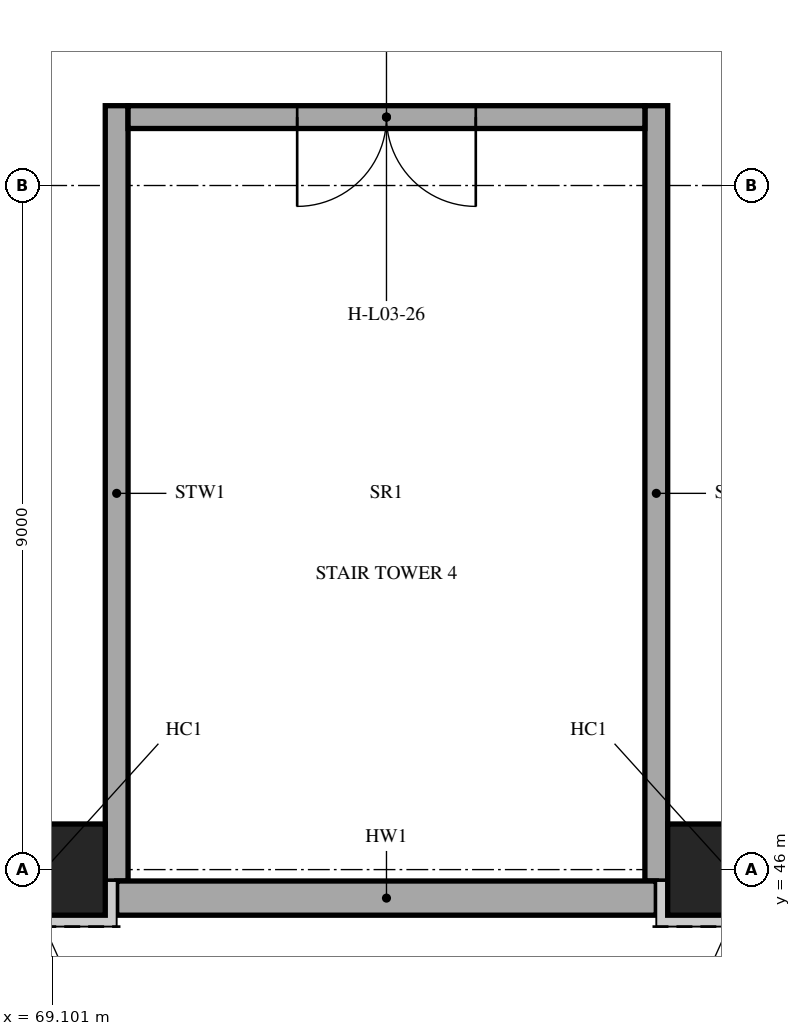
"""IFC4 building model, lengths in metres.
Left out: names, types, materials, properties, quantities, classifications, styles, units other than length and angle.
Written with IfcOpenShell. Run it as: python <this file> out.ifc"""

import sys

from ifc_helpers import new_model, si_unit, direction, frame, frame_2d, origin, origin_2d, place, context, subcontext, project, spatial, rectangle, extrude, element, fill, save


model = new_model("IFC4")
c1 = context("Model", 3, precision=1e-05, world=origin(), true_north=direction((0.0, 1.0)))
c2 = subcontext(c1, "Body", "Model", "MODEL_VIEW")
j1 = project(units=[si_unit("LENGTHUNIT", "METRE"), si_unit("PLANEANGLEUNIT", "RADIAN")], contexts=[c1])
p1 = place(None, origin())
s1 = spatial("IfcSite", under=j1, at=p1, CompositionType="ELEMENT")
p2 = place(p1, origin())
s2 = spatial("IfcBuilding", under=s1, at=p2, CompositionType="ELEMENT")
p3 = place(p2, frame((0.0, 0.0, 15.0)))
s3 = spatial("IfcBuildingStorey", under=s2, at=p3, CompositionType="ELEMENT", Elevation=15.0)
for number, where, z_axis, x_axis in (
    (1, (69.0, 46.0, 0.0), (0.0, 0.0, 1.0), (1.0, 0.0, 0.0)),
    (2, (78.0, 46.0, 0.0), (0.0, 0.0, 1.0), (1.0, 0.0, 0.0)),
):
    element("IfcColumn", number, at=place(p3, frame(where, z_axis=z_axis, x_axis=x_axis)), inside=s3, PredefinedType="COLUMN", context=c2, shape_type="SweptSolid", body=[
        extrude(rectangle(XDim=1.6, YDim=1.2, at=origin_2d()), origin(), (0.0, 0.0, 1.0), 4.2),
    ])
for number, where, z_axis, x_axis in (
    (3, (69.95, 45.85, 0.0), (0.0, 0.0, 1.0), (0.0, 1.0, 0.0)),
    (4, (77.05, 45.85, 0.0), (0.0, 0.0, 1.0), (0.0, 1.0, 0.0)),
):
    element("IfcWall", number, at=place(p3, frame(where, z_axis=z_axis, x_axis=x_axis)), inside=s3, PredefinedType="SHEAR", context=c2, shape_type="SweptSolid", body=[
        extrude(rectangle(XDim=10.2, YDim=0.3, at=frame_2d((5.1, 0.0))), origin(), (0.0, 0.0, 1.0), 3.9),
    ])
p4 = place(p3, frame((70.1, 55.9, 0.0), z_axis=(0.0, 0.0, 1.0), x_axis=(1.0, 0.0, 0.0)))
e5 = element("IfcWall", 5, at=p4, inside=s3, PredefinedType="SHEAR", context=c2, shape_type="SweptSolid", body=[
    extrude(rectangle(XDim=6.8, YDim=0.3, at=frame_2d((3.4, 0.0))), origin(), (0.0, 0.0, 1.0), 3.9),
])
p5 = place(p4, frame((2.225, 0.0, 0.0)))
e6 = element("IfcOpeningElement", 6, at=p5, cuts=e5, PredefinedType="OPENING", context=c2, shape_type="SweptSolid", body=[
    extrude(rectangle(XDim=2.35, YDim=2.1, at=frame_2d((1.175, 1.05))), frame((0.0, 0.16, 0.0), z_axis=(0.0, -1.0, 0.0), x_axis=(1.0, 0.0, 0.0)), (0.0, 0.0, 1.0), 0.32),
])
p6 = place(p3, frame((69.95, 45.625, 0.0), z_axis=(0.0, 0.0, 1.0), x_axis=(1.0, 0.0, 0.0)))
e7 = element("IfcWall", 7, at=p6, inside=s3, PredefinedType="SOLIDWALL", context=c2, shape_type="SweptSolid", body=[
    extrude(rectangle(XDim=7.1, YDim=0.45, at=frame_2d((3.55, 0.0))), origin(), (0.0, 0.0, 1.0), 4.2),
])
p7 = place(p5, frame((2.35, 0.0, 0.0), z_axis=(0.0, 0.0, 1.0), x_axis=(-1.0, 0.0, 0.0)))
e8 = element("IfcDoor", 8, at=p7, inside=s3, OperationType="DOUBLE_DOOR_SINGLE_SWING", PredefinedType="DOOR", context=c2, shape_type="SweptSolid", body=[
    extrude(rectangle(XDim=2.35, YDim=2.1, at=frame_2d((1.175, 1.05))), frame((0.0, 0.025, 0.0), z_axis=(0.0, -1.0, 0.0), x_axis=(1.0, 0.0, 0.0)), (0.0, 0.0, 1.0), 0.05),
])
fill(e6, e8)
save(model, sys.argv[1])
